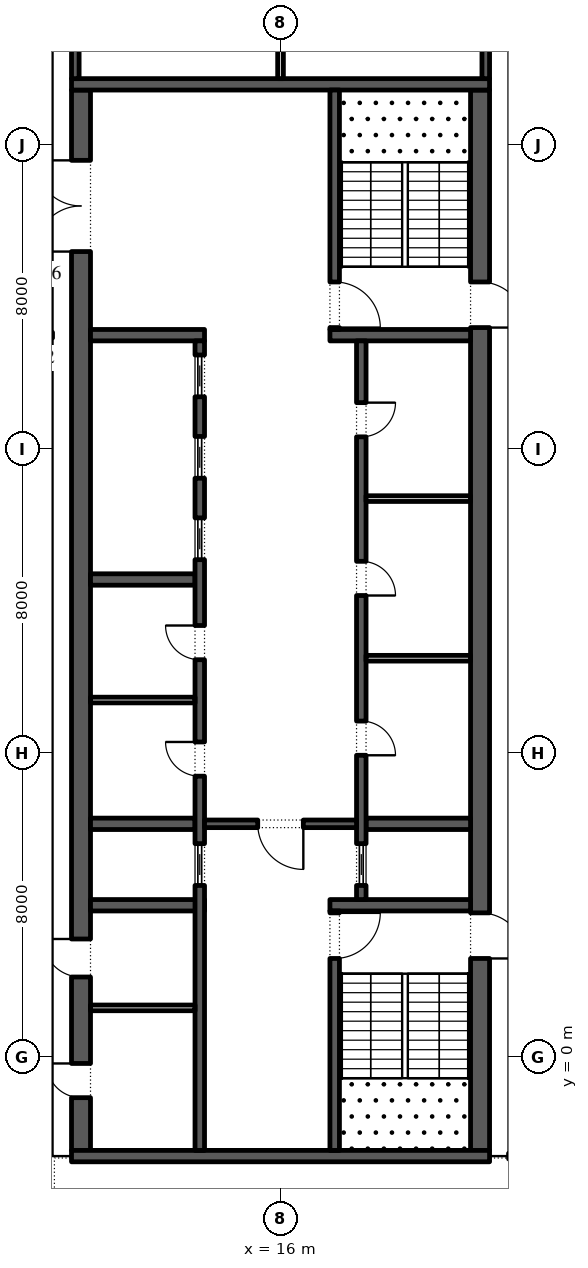
"""IFC4 building model, lengths in metres.
Left out: names, types, materials, properties, quantities, classifications, styles, units other than length and angle.
Written with IfcOpenShell. Run it as: python <this file> out.ifc"""

import sys

from ifc_helpers import new_model, si_unit, direction, frame, frame_2d, origin, place, context, subcontext, project, spatial, rectangle, extrude, element, fill, save


model = new_model("IFC4")
c1 = context("Model", 3, precision=1e-05, world=origin(), true_north=direction((0.0, 1.0)))
c2 = subcontext(c1, "Body", "Model", "MODEL_VIEW")
j1 = project(units=[si_unit("LENGTHUNIT", "METRE"), si_unit("PLANEANGLEUNIT", "RADIAN")], contexts=[c1])
p1 = place(None, origin())
s1 = spatial("IfcSite", under=j1, at=p1, CompositionType="ELEMENT")
p2 = place(p1, origin())
s2 = spatial("IfcBuilding", under=s1, at=p2, CompositionType="ELEMENT")
p3 = place(p2, frame((0.0, 0.0, 334.2)))
s3 = spatial("IfcBuildingStorey", under=s2, at=p3, CompositionType="ELEMENT", Elevation=334.2)
p4 = place(p3, frame((21.25, -2.45, 0.0), z_axis=(0.0, 0.0, 1.0), x_axis=(0.0, 1.0, 0.0)))
e1 = element("IfcWall", 1, at=p4, inside=s3, PredefinedType="SHEAR", context=c2, shape_type="SweptSolid", body=[
    extrude(rectangle(XDim=27.9, YDim=0.5, at=frame_2d((13.95, 0.0))), origin(), (0.0, 0.0, 1.0), 4.0),
])
p5 = place(p4, frame((5.05, 0.0, 0.0)))
e2 = element("IfcOpeningElement", 2, at=p5, cuts=e1, PredefinedType="OPENING", context=c2, shape_type="SweptSolid", body=[
    extrude(rectangle(XDim=1.2, YDim=2.1, at=frame_2d((0.6, 1.05))), frame((0.0, 0.26, 0.0), z_axis=(0.0, -1.0, 0.0), x_axis=(1.0, 0.0, 0.0)), (0.0, 0.0, 1.0), 0.52),
])
p6 = place(p4, frame((21.65, 0.0, 0.0)))
e3 = element("IfcOpeningElement", 3, at=p6, cuts=e1, PredefinedType="OPENING", context=c2, shape_type="SweptSolid", body=[
    extrude(rectangle(XDim=1.2, YDim=2.1, at=frame_2d((0.6, 1.05))), frame((0.0, 0.26, 0.0), z_axis=(0.0, -1.0, 0.0), x_axis=(1.0, 0.0, 0.0)), (0.0, 0.0, 1.0), 0.52),
])
p7 = place(p3, frame((10.75, -2.45, 0.0), z_axis=(0.0, 0.0, 1.0), x_axis=(0.0, 1.0, 0.0)))
e4 = element("IfcWall", 4, at=p7, inside=s3, PredefinedType="SHEAR", context=c2, shape_type="SweptSolid", body=[
    extrude(rectangle(XDim=27.9, YDim=0.5, at=frame_2d((13.95, 0.0))), origin(), (0.0, 0.0, 1.0), 4.0),
])
p8 = place(p7, frame((23.65, 0.0, 0.0)))
e5 = element("IfcOpeningElement", 5, at=p8, cuts=e4, PredefinedType="OPENING", context=c2, shape_type="SweptSolid", body=[
    extrude(rectangle(XDim=2.4, YDim=2.1, at=frame_2d((1.2, 1.05))), frame((0.0, 0.26, 0.0), z_axis=(0.0, -1.0, 0.0), x_axis=(1.0, 0.0, 0.0)), (0.0, 0.0, 1.0), 0.52),
])
p9 = place(p7, frame((1.387, 0.0, 0.0)))
e6 = element("IfcOpeningElement", 6, at=p9, cuts=e4, PredefinedType="OPENING", context=c2, shape_type="SweptSolid", body=[
    extrude(rectangle(XDim=0.9, YDim=2.1, at=frame_2d((0.45, 1.05))), frame((0.0, 0.26, 0.0), z_axis=(0.0, -1.0, 0.0), x_axis=(1.0, 0.0, 0.0)), (0.0, 0.0, 1.0), 0.52),
])
p10 = place(p7, frame((4.562, 0.0, 0.0)))
e7 = element("IfcOpeningElement", 7, at=p10, cuts=e4, PredefinedType="OPENING", context=c2, shape_type="SweptSolid", body=[
    extrude(rectangle(XDim=1.0, YDim=2.1, at=frame_2d((0.5, 1.05))), frame((0.0, 0.26, 0.0), z_axis=(0.0, -1.0, 0.0), x_axis=(1.0, 0.0, 0.0)), (0.0, 0.0, 1.0), 0.52),
])
for number, where, z_axis, x_axis in (
    (8, (10.5, -2.6, 0.0), (0.0, 0.0, 1.0), (1.0, 0.0, 0.0)),
    (9, (10.5, 25.6, 0.0), (0.0, 0.0, 1.0), (1.0, 0.0, 0.0)),
):
    element("IfcWall", number, at=place(p3, frame(where, z_axis=z_axis, x_axis=x_axis)), inside=s3, PredefinedType="SHEAR", context=c2, shape_type="SweptSolid", body=[
        extrude(rectangle(XDim=11.0, YDim=0.3, at=frame_2d((5.5, 0.0))), origin(), (0.0, 0.0, 1.0), 4.0),
    ])
p11 = place(p3, frame((17.3, 4.0, 0.0), z_axis=(0.0, 0.0, 1.0), x_axis=(1.0, 0.0, 0.0)))
e10 = element("IfcWall", 10, at=p11, inside=s3, PredefinedType="SHEAR", context=c2, shape_type="SweptSolid", body=[
    extrude(rectangle(XDim=3.7, YDim=0.3, at=frame_2d((1.85, 0.0))), origin(), (0.0, 0.0, 1.0), 4.0),
])
p12 = place(p3, frame((17.425, -2.45, 0.0), z_axis=(0.0, 0.0, 1.0), x_axis=(0.0, 1.0, 0.0)))
e11 = element("IfcWall", 11, at=p12, inside=s3, PredefinedType="SHEAR", context=c2, shape_type="SweptSolid", body=[
    extrude(rectangle(XDim=6.3, YDim=0.25, at=frame_2d((3.15, 0.0))), origin(), (0.0, 0.0, 1.0), 4.0),
])
p13 = place(p12, frame((5.05, 0.0, 0.0)))
e12 = element("IfcOpeningElement", 12, at=p13, cuts=e11, PredefinedType="OPENING", context=c2, shape_type="SweptSolid", body=[
    extrude(rectangle(XDim=1.2, YDim=2.1, at=frame_2d((0.6, 1.05))), frame((0.0, 0.135, 0.0), z_axis=(0.0, -1.0, 0.0), x_axis=(1.0, 0.0, 0.0)), (0.0, 0.0, 1.0), 0.27),
])
p14 = place(p3, frame((17.3, 19.0, 0.0), z_axis=(0.0, 0.0, 1.0), x_axis=(1.0, 0.0, 0.0)))
e13 = element("IfcWall", 13, at=p14, inside=s3, PredefinedType="SHEAR", context=c2, shape_type="SweptSolid", body=[
    extrude(rectangle(XDim=3.7, YDim=0.3, at=frame_2d((1.85, 0.0))), origin(), (0.0, 0.0, 1.0), 4.0),
])
p15 = place(p3, frame((17.425, 19.15, 0.0), z_axis=(0.0, 0.0, 1.0), x_axis=(0.0, 1.0, 0.0)))
e14 = element("IfcWall", 14, at=p15, inside=s3, PredefinedType="SHEAR", context=c2, shape_type="SweptSolid", body=[
    extrude(rectangle(XDim=6.3, YDim=0.25, at=frame_2d((3.15, 0.0))), origin(), (0.0, 0.0, 1.0), 4.0),
])
p16 = place(p15, frame((0.05, 0.0, 0.0)))
e15 = element("IfcOpeningElement", 15, at=p16, cuts=e14, PredefinedType="OPENING", context=c2, shape_type="SweptSolid", body=[
    extrude(rectangle(XDim=1.2, YDim=2.1, at=frame_2d((0.6, 1.05))), frame((0.0, 0.135, 0.0), z_axis=(0.0, -1.0, 0.0), x_axis=(1.0, 0.0, 0.0)), (0.0, 0.0, 1.0), 0.27),
])
p17 = place(p3, frame((18.25, 6.143, 0.0), z_axis=(0.0, 0.0, 1.0), x_axis=(1.0, 0.0, 0.0)))
e16 = element("IfcWall", 16, at=p17, inside=s3, PredefinedType="SHEAR", context=c2, shape_type="SweptSolid", body=[
    extrude(rectangle(XDim=2.75, YDim=0.3, at=frame_2d((1.375, 0.0))), origin(), (0.0, 0.0, 1.0), 4.0),
])
p18 = place(p3, frame((18.125, 4.15, 0.0), z_axis=(0.0, 0.0, 1.0), x_axis=(0.0, 1.0, 0.0)))
e17 = element("IfcWall", 17, at=p18, inside=s3, PredefinedType="SHEAR", context=c2, shape_type="SweptSolid", body=[
    extrude(rectangle(XDim=14.7, YDim=0.25, at=frame_2d((7.35, 0.0))), origin(), (0.0, 0.0, 1.0), 4.0),
])
p19 = place(p18, frame((3.796, 0.0, 0.0)))
e18 = element("IfcOpeningElement", 18, at=p19, cuts=e17, PredefinedType="OPENING", context=c2, shape_type="SweptSolid", body=[
    extrude(rectangle(XDim=0.9, YDim=2.1, at=frame_2d((0.45, 1.05))), frame((0.0, 0.135, 0.0), z_axis=(0.0, -1.0, 0.0), x_axis=(1.0, 0.0, 0.0)), (0.0, 0.0, 1.0), 0.27),
])
p20 = place(p18, frame((8.0, 0.0, 0.0)))
e19 = element("IfcOpeningElement", 19, at=p20, cuts=e17, PredefinedType="OPENING", context=c2, shape_type="SweptSolid", body=[
    extrude(rectangle(XDim=0.9, YDim=2.1, at=frame_2d((0.45, 1.05))), frame((0.0, 0.135, 0.0), z_axis=(0.0, -1.0, 0.0), x_axis=(1.0, 0.0, 0.0)), (0.0, 0.0, 1.0), 0.27),
])
p21 = place(p18, frame((12.175, 0.0, 0.0)))
e20 = element("IfcOpeningElement", 20, at=p21, cuts=e17, PredefinedType="OPENING", context=c2, shape_type="SweptSolid", body=[
    extrude(rectangle(XDim=0.9, YDim=2.1, at=frame_2d((0.45, 1.05))), frame((0.0, 0.135, 0.0), z_axis=(0.0, -1.0, 0.0), x_axis=(1.0, 0.0, 0.0)), (0.0, 0.0, 1.0), 0.27),
])
p22 = place(p18, frame((0.371, 0.0, 0.0)))
e21 = element("IfcOpeningElement", 21, at=p22, cuts=e17, PredefinedType="OPENING", context=c2, shape_type="SweptSolid", body=[
    extrude(rectangle(XDim=1.1, YDim=2.1, at=frame_2d((0.55, 1.05))), frame((0.0, 0.135, 0.0), z_axis=(0.0, -1.0, 0.0), x_axis=(1.0, 0.0, 0.0)), (0.0, 0.0, 1.0), 0.27),
])
for number, where, z_axis, x_axis in (
    (22, (18.25, 10.5, 0.0), (0.0, 0.0, 1.0), (1.0, 0.0, 0.0)),
    (23, (18.25, 14.7, 0.0), (0.0, 0.0, 1.0), (1.0, 0.0, 0.0)),
):
    element("IfcWall", number, at=place(p3, frame(where, z_axis=z_axis, x_axis=x_axis)), inside=s3, PredefinedType="PARTITIONING", context=c2, shape_type="SweptSolid", body=[
        extrude(rectangle(XDim=2.75, YDim=0.15, at=frame_2d((1.375, 0.0))), origin(), (0.0, 0.0, 1.0), 4.0),
    ])
p23 = place(p3, frame((11.0, 4.0, 0.0), z_axis=(0.0, 0.0, 1.0), x_axis=(1.0, 0.0, 0.0)))
e24 = element("IfcWall", 24, at=p23, inside=s3, PredefinedType="SHEAR", context=c2, shape_type="SweptSolid", body=[
    extrude(rectangle(XDim=3.0, YDim=0.3, at=frame_2d((1.5, 0.0))), origin(), (0.0, 0.0, 1.0), 4.0),
])
for number, where, z_axis, x_axis in (
    (25, (11.0, 6.143, 0.0), (0.0, 0.0, 1.0), (1.0, 0.0, 0.0)),
    (26, (11.0, 12.571, 0.0), (0.0, 0.0, 1.0), (1.0, 0.0, 0.0)),
):
    element("IfcWall", number, at=place(p3, frame(where, z_axis=z_axis, x_axis=x_axis)), inside=s3, PredefinedType="SHEAR", context=c2, shape_type="SweptSolid", body=[
        extrude(rectangle(XDim=2.75, YDim=0.3, at=frame_2d((1.375, 0.0))), origin(), (0.0, 0.0, 1.0), 4.0),
    ])
p24 = place(p3, frame((11.0, 19.0, 0.0), z_axis=(0.0, 0.0, 1.0), x_axis=(1.0, 0.0, 0.0)))
e27 = element("IfcWall", 27, at=p24, inside=s3, PredefinedType="SHEAR", context=c2, shape_type="SweptSolid", body=[
    extrude(rectangle(XDim=3.0, YDim=0.3, at=frame_2d((1.5, 0.0))), origin(), (0.0, 0.0, 1.0), 4.0),
])
p25 = place(p3, frame((13.875, -2.45, 0.0), z_axis=(0.0, 0.0, 1.0), x_axis=(0.0, 1.0, 0.0)))
e28 = element("IfcWall", 28, at=p25, inside=s3, PredefinedType="SHEAR", context=c2, shape_type="SweptSolid", body=[
    extrude(rectangle(XDim=21.3, YDim=0.25, at=frame_2d((10.65, 0.0))), origin(), (0.0, 0.0, 1.0), 4.0),
])
p26 = place(p25, frame((9.846, 0.0, 0.0)))
e29 = element("IfcOpeningElement", 29, at=p26, cuts=e28, PredefinedType="OPENING", context=c2, shape_type="SweptSolid", body=[
    extrude(rectangle(XDim=0.9, YDim=2.1, at=frame_2d((0.45, 1.05))), frame((0.0, 0.135, 0.0), z_axis=(0.0, -1.0, 0.0), x_axis=(1.0, 0.0, 0.0)), (0.0, 0.0, 1.0), 0.27),
])
p27 = place(p25, frame((12.911, 0.0, 0.0)))
e30 = element("IfcOpeningElement", 30, at=p27, cuts=e28, PredefinedType="OPENING", context=c2, shape_type="SweptSolid", body=[
    extrude(rectangle(XDim=0.9, YDim=2.1, at=frame_2d((0.45, 1.05))), frame((0.0, 0.135, 0.0), z_axis=(0.0, -1.0, 0.0), x_axis=(1.0, 0.0, 0.0)), (0.0, 0.0, 1.0), 0.27),
])
p28 = place(p25, frame((6.971, 0.0, 0.0)))
e31 = element("IfcOpeningElement", 31, at=p28, cuts=e28, PredefinedType="OPENING", context=c2, shape_type="SweptSolid", body=[
    extrude(rectangle(XDim=1.1, YDim=2.1, at=frame_2d((0.55, 1.05))), frame((0.0, 0.135, 0.0), z_axis=(0.0, -1.0, 0.0), x_axis=(1.0, 0.0, 0.0)), (0.0, 0.0, 1.0), 0.27),
])
p29 = place(p25, frame((15.543, 0.0, 0.0)))
e32 = element("IfcOpeningElement", 32, at=p29, cuts=e28, PredefinedType="OPENING", context=c2, shape_type="SweptSolid", body=[
    extrude(rectangle(XDim=1.1, YDim=2.1, at=frame_2d((0.55, 1.05))), frame((0.0, 0.135, 0.0), z_axis=(0.0, -1.0, 0.0), x_axis=(1.0, 0.0, 0.0)), (0.0, 0.0, 1.0), 0.27),
])
p30 = place(p25, frame((17.686, 0.0, 0.0)))
e33 = element("IfcOpeningElement", 33, at=p30, cuts=e28, PredefinedType="OPENING", context=c2, shape_type="SweptSolid", body=[
    extrude(rectangle(XDim=1.1, YDim=2.1, at=frame_2d((0.55, 1.05))), frame((0.0, 0.135, 0.0), z_axis=(0.0, -1.0, 0.0), x_axis=(1.0, 0.0, 0.0)), (0.0, 0.0, 1.0), 0.27),
])
p31 = place(p25, frame((19.829, 0.0, 0.0)))
e34 = element("IfcOpeningElement", 34, at=p31, cuts=e28, PredefinedType="OPENING", context=c2, shape_type="SweptSolid", body=[
    extrude(rectangle(XDim=1.1, YDim=2.1, at=frame_2d((0.55, 1.05))), frame((0.0, 0.135, 0.0), z_axis=(0.0, -1.0, 0.0), x_axis=(1.0, 0.0, 0.0)), (0.0, 0.0, 1.0), 0.27),
])
p32 = place(p3, frame((11.0, 9.4, 0.0), z_axis=(0.0, 0.0, 1.0), x_axis=(1.0, 0.0, 0.0)))
e35 = element("IfcWall", 35, at=p32, inside=s3, PredefinedType="PARTITIONING", context=c2, shape_type="SweptSolid", body=[
    extrude(rectangle(XDim=2.75, YDim=0.15, at=frame_2d((1.375, 0.0))), origin(), (0.0, 0.0, 1.0), 4.0),
])
p33 = place(p3, frame((14.0, 6.143, 0.0), z_axis=(0.0, 0.0, 1.0), x_axis=(1.0, 0.0, 0.0)))
e36 = element("IfcWall", 36, at=p33, inside=s3, PredefinedType="SHEAR", context=c2, shape_type="SweptSolid", body=[
    extrude(rectangle(XDim=4.0, YDim=0.2, at=frame_2d((2.0, 0.0))), origin(), (0.0, 0.0, 1.0), 4.0),
])
p34 = place(p33, frame((1.4, 0.0, 0.0)))
e37 = element("IfcOpeningElement", 37, at=p34, cuts=e36, PredefinedType="OPENING", context=c2, shape_type="SweptSolid", body=[
    extrude(rectangle(XDim=1.2, YDim=2.1, at=frame_2d((0.6, 1.05))), frame((0.0, 0.11, 0.0), z_axis=(0.0, -1.0, 0.0), x_axis=(1.0, 0.0, 0.0)), (0.0, 0.0, 1.0), 0.22),
])
p35 = place(p3, frame((11.0, 1.3, 0.0), z_axis=(0.0, 0.0, 1.0), x_axis=(1.0, 0.0, 0.0)))
e38 = element("IfcWall", 38, at=p35, inside=s3, PredefinedType="PARTITIONING", context=c2, shape_type="SweptSolid", body=[
    extrude(rectangle(XDim=2.75, YDim=0.15, at=frame_2d((1.375, 0.0))), origin(), (0.0, 0.0, 1.0), 4.0),
])
p36 = place(p3, frame((21.4, 25.75, 0.0), z_axis=(0.0, 0.0, 1.0), x_axis=(0.0, 1.0, 0.0)))
e39 = element("IfcWall", 39, at=p36, inside=s3, PredefinedType="SHEAR", context=c2, shape_type="SweptSolid", body=[
    extrude(rectangle(XDim=15.05, YDim=0.2, at=frame_2d((7.525, 0.0))), origin(), (0.0, 0.0, 1.0), 4.0),
])
p37 = place(p36, frame((7.075, 0.0, 0.0)))
e40 = element("IfcOpeningElement", 40, at=p37, cuts=e39, PredefinedType="OPENING", context=c2, shape_type="SweptSolid", body=[
    extrude(rectangle(XDim=0.9, YDim=2.1, at=frame_2d((0.45, 1.05))), frame((0.0, 0.11, 0.0), z_axis=(0.0, -1.0, 0.0), x_axis=(1.0, 0.0, 0.0)), (0.0, 0.0, 1.0), 0.22),
])
p38 = place(p3, frame((10.6, 25.75, 0.0), z_axis=(0.0, 0.0, 1.0), x_axis=(0.0, 1.0, 0.0)))
e41 = element("IfcWall", 41, at=p38, inside=s3, PredefinedType="SHEAR", context=c2, shape_type="SweptSolid", body=[
    extrude(rectangle(XDim=15.05, YDim=0.2, at=frame_2d((7.525, 0.0))), origin(), (0.0, 0.0, 1.0), 4.0),
])
p39 = place(p38, frame((7.075, 0.0, 0.0)))
e42 = element("IfcOpeningElement", 42, at=p39, cuts=e41, PredefinedType="OPENING", context=c2, shape_type="SweptSolid", body=[
    extrude(rectangle(XDim=0.9, YDim=2.1, at=frame_2d((0.45, 1.05))), frame((0.0, 0.11, 0.0), z_axis=(0.0, -1.0, 0.0), x_axis=(1.0, 0.0, 0.0)), (0.0, 0.0, 1.0), 0.22),
])
p40 = place(p3, frame((16.0, 25.75, 0.0), z_axis=(0.0, 0.0, 1.0), x_axis=(0.0, 1.0, 0.0)))
e43 = element("IfcWall", 43, at=p40, inside=s3, PredefinedType="PARTITIONING", context=c2, shape_type="SweptSolid", body=[
    extrude(rectangle(XDim=15.05, YDim=0.15, at=frame_2d((7.525, 0.0))), origin(), (0.0, 0.0, 1.0), 4.0),
])
p41 = place(p19, frame((0.9, -0.2, 0.0), z_axis=(0.0, 0.0, 1.0), x_axis=(-1.0, 0.0, 0.0)))
e44 = element("IfcDoor", 44, at=p41, inside=s3, OperationType="SINGLE_SWING_LEFT", PredefinedType="DOOR", context=c2, shape_type="SweptSolid", body=[
    extrude(rectangle(XDim=0.9, YDim=2.1, at=frame_2d((0.45, 1.05))), frame((0.0, -0.075, 0.0), z_axis=(0.0, -1.0, 0.0), x_axis=(1.0, 0.0, 0.0)), (0.0, 0.0, 1.0), 0.05),
])
fill(e18, e44)
p42 = place(p20, frame((0.9, -0.2, 0.0), z_axis=(0.0, 0.0, 1.0), x_axis=(-1.0, 0.0, 0.0)))
e45 = element("IfcDoor", 45, at=p42, inside=s3, OperationType="SINGLE_SWING_LEFT", PredefinedType="DOOR", context=c2, shape_type="SweptSolid", body=[
    extrude(rectangle(XDim=0.9, YDim=2.1, at=frame_2d((0.45, 1.05))), frame((0.0, -0.075, 0.0), z_axis=(0.0, -1.0, 0.0), x_axis=(1.0, 0.0, 0.0)), (0.0, 0.0, 1.0), 0.05),
])
fill(e19, e45)
p43 = place(p21, frame((0.9, -0.2, 0.0), z_axis=(0.0, 0.0, 1.0), x_axis=(-1.0, 0.0, 0.0)))
e46 = element("IfcDoor", 46, at=p43, inside=s3, OperationType="SINGLE_SWING_RIGHT", PredefinedType="DOOR", context=c2, shape_type="SweptSolid", body=[
    extrude(rectangle(XDim=0.9, YDim=2.1, at=frame_2d((0.45, 1.05))), frame((0.0, -0.075, 0.0), z_axis=(0.0, -1.0, 0.0), x_axis=(1.0, 0.0, 0.0)), (0.0, 0.0, 1.0), 0.05),
])
fill(e20, e46)
p44 = place(p22, origin())
e47 = element("IfcDoor", 47, at=p44, inside=s3, OperationType="SLIDING_TO_LEFT", PredefinedType="DOOR", context=c2, shape_type="SweptSolid", body=[
    extrude(rectangle(XDim=1.1, YDim=2.1, at=frame_2d((0.55, 1.05))), frame((0.0, 0.025, 0.0), z_axis=(0.0, -1.0, 0.0), x_axis=(1.0, 0.0, 0.0)), (0.0, 0.0, 1.0), 0.05),
])
fill(e21, e47)
p45 = place(p26, origin())
e48 = element("IfcDoor", 48, at=p45, inside=s3, OperationType="SINGLE_SWING_LEFT", PredefinedType="DOOR", context=c2, shape_type="SweptSolid", body=[
    extrude(rectangle(XDim=0.9, YDim=2.1, at=frame_2d((0.45, 1.05))), frame((0.0, 0.125, 0.0), z_axis=(0.0, -1.0, 0.0), x_axis=(1.0, 0.0, 0.0)), (0.0, 0.0, 1.0), 0.05),
])
fill(e29, e48)
p46 = place(p27, origin())
e49 = element("IfcDoor", 49, at=p46, inside=s3, OperationType="SINGLE_SWING_LEFT", PredefinedType="DOOR", context=c2, shape_type="SweptSolid", body=[
    extrude(rectangle(XDim=0.9, YDim=2.1, at=frame_2d((0.45, 1.05))), frame((0.0, 0.125, 0.0), z_axis=(0.0, -1.0, 0.0), x_axis=(1.0, 0.0, 0.0)), (0.0, 0.0, 1.0), 0.05),
])
fill(e30, e49)
p47 = place(p28, origin())
e50 = element("IfcDoor", 50, at=p47, inside=s3, OperationType="SLIDING_TO_LEFT", PredefinedType="DOOR", context=c2, shape_type="SweptSolid", body=[
    extrude(rectangle(XDim=1.1, YDim=2.1, at=frame_2d((0.55, 1.05))), frame((0.0, 0.025, 0.0), z_axis=(0.0, -1.0, 0.0), x_axis=(1.0, 0.0, 0.0)), (0.0, 0.0, 1.0), 0.05),
])
fill(e31, e50)
p48 = place(p29, origin())
e51 = element("IfcDoor", 51, at=p48, inside=s3, OperationType="SLIDING_TO_LEFT", PredefinedType="DOOR", context=c2, shape_type="SweptSolid", body=[
    extrude(rectangle(XDim=1.1, YDim=2.1, at=frame_2d((0.55, 1.05))), frame((0.0, 0.025, 0.0), z_axis=(0.0, -1.0, 0.0), x_axis=(1.0, 0.0, 0.0)), (0.0, 0.0, 1.0), 0.05),
])
fill(e32, e51)
p49 = place(p30, origin())
e52 = element("IfcDoor", 52, at=p49, inside=s3, OperationType="SLIDING_TO_LEFT", PredefinedType="DOOR", context=c2, shape_type="SweptSolid", body=[
    extrude(rectangle(XDim=1.1, YDim=2.1, at=frame_2d((0.55, 1.05))), frame((0.0, 0.025, 0.0), z_axis=(0.0, -1.0, 0.0), x_axis=(1.0, 0.0, 0.0)), (0.0, 0.0, 1.0), 0.05),
])
fill(e33, e52)
p50 = place(p31, origin())
e53 = element("IfcDoor", 53, at=p50, inside=s3, OperationType="SLIDING_TO_LEFT", PredefinedType="DOOR", context=c2, shape_type="SweptSolid", body=[
    extrude(rectangle(XDim=1.1, YDim=2.1, at=frame_2d((0.55, 1.05))), frame((0.0, 0.025, 0.0), z_axis=(0.0, -1.0, 0.0), x_axis=(1.0, 0.0, 0.0)), (0.0, 0.0, 1.0), 0.05),
])
fill(e34, e53)
p51 = place(p34, frame((1.2, 0.0, 0.0), z_axis=(0.0, 0.0, 1.0), x_axis=(-1.0, 0.0, 0.0)))
e54 = element("IfcDoor", 54, at=p51, inside=s3, OperationType="SINGLE_SWING_RIGHT", PredefinedType="DOOR", context=c2, shape_type="SweptSolid", body=[
    extrude(rectangle(XDim=1.2, YDim=2.1, at=frame_2d((0.6, 1.05))), frame((0.0, 0.025, 0.0), z_axis=(0.0, -1.0, 0.0), x_axis=(1.0, 0.0, 0.0)), (0.0, 0.0, 1.0), 0.05),
])
fill(e37, e54)
p52 = place(p8, origin())
e55 = element("IfcDoor", 55, at=p52, inside=s3, OperationType="DOUBLE_DOOR_SINGLE_SWING", PredefinedType="DOOR", context=c2, shape_type="SweptSolid", body=[
    extrude(rectangle(XDim=2.4, YDim=2.1, at=frame_2d((1.2, 1.05))), frame((0.0, 0.025, 0.0), z_axis=(0.0, -1.0, 0.0), x_axis=(1.0, 0.0, 0.0)), (0.0, 0.0, 1.0), 0.05),
])
fill(e5, e55)
p53 = place(p13, frame((1.2, 0.0, 0.0), z_axis=(0.0, 0.0, 1.0), x_axis=(-1.0, 0.0, 0.0)))
e56 = element("IfcDoor", 56, at=p53, inside=s3, OperationType="SINGLE_SWING_RIGHT", PredefinedType="DOOR", context=c2, shape_type="SweptSolid", body=[
    extrude(rectangle(XDim=1.2, YDim=2.1, at=frame_2d((0.6, 1.05))), frame((0.0, 0.025, 0.0), z_axis=(0.0, -1.0, 0.0), x_axis=(1.0, 0.0, 0.0)), (0.0, 0.0, 1.0), 0.05),
])
fill(e12, e56)
p54 = place(p5, frame((1.2, 0.0, 0.0), z_axis=(0.0, 0.0, 1.0), x_axis=(-1.0, 0.0, 0.0)))
e57 = element("IfcDoor", 57, at=p54, inside=s3, OperationType="SINGLE_SWING_LEFT", PredefinedType="DOOR", context=c2, shape_type="SweptSolid", body=[
    extrude(rectangle(XDim=1.2, YDim=2.1, at=frame_2d((0.6, 1.05))), frame((0.0, 0.025, 0.0), z_axis=(0.0, -1.0, 0.0), x_axis=(1.0, 0.0, 0.0)), (0.0, 0.0, 1.0), 0.05),
])
fill(e2, e57)
p55 = place(p16, frame((1.2, 0.0, 0.0), z_axis=(0.0, 0.0, 1.0), x_axis=(-1.0, 0.0, 0.0)))
e58 = element("IfcDoor", 58, at=p55, inside=s3, OperationType="SINGLE_SWING_LEFT", PredefinedType="DOOR", context=c2, shape_type="SweptSolid", body=[
    extrude(rectangle(XDim=1.2, YDim=2.1, at=frame_2d((0.6, 1.05))), frame((0.0, 0.025, 0.0), z_axis=(0.0, -1.0, 0.0), x_axis=(1.0, 0.0, 0.0)), (0.0, 0.0, 1.0), 0.05),
])
fill(e15, e58)
p56 = place(p6, frame((1.2, 0.0, 0.0), z_axis=(0.0, 0.0, 1.0), x_axis=(-1.0, 0.0, 0.0)))
e59 = element("IfcDoor", 59, at=p56, inside=s3, OperationType="SINGLE_SWING_LEFT", PredefinedType="DOOR", context=c2, shape_type="SweptSolid", body=[
    extrude(rectangle(XDim=1.2, YDim=2.1, at=frame_2d((0.6, 1.05))), frame((0.0, 0.025, 0.0), z_axis=(0.0, -1.0, 0.0), x_axis=(1.0, 0.0, 0.0)), (0.0, 0.0, 1.0), 0.05),
])
fill(e3, e59)
p57 = place(p9, origin())
e60 = element("IfcDoor", 60, at=p57, inside=s3, OperationType="SINGLE_SWING_LEFT", PredefinedType="DOOR", context=c2, shape_type="SweptSolid", body=[
    extrude(rectangle(XDim=0.9, YDim=2.1, at=frame_2d((0.45, 1.05))), frame((0.0, -0.2, 0.0), z_axis=(0.0, -1.0, 0.0), x_axis=(1.0, 0.0, 0.0)), (0.0, 0.0, 1.0), 0.05),
])
fill(e6, e60)
p58 = place(p10, origin())
e61 = element("IfcDoor", 61, at=p58, inside=s3, OperationType="SINGLE_SWING_LEFT", PredefinedType="DOOR", context=c2, shape_type="SweptSolid", body=[
    extrude(rectangle(XDim=1.0, YDim=2.1, at=frame_2d((0.5, 1.05))), frame((0.0, -0.2, 0.0), z_axis=(0.0, -1.0, 0.0), x_axis=(1.0, 0.0, 0.0)), (0.0, 0.0, 1.0), 0.05),
])
fill(e7, e61)
save(model, sys.argv[1])
